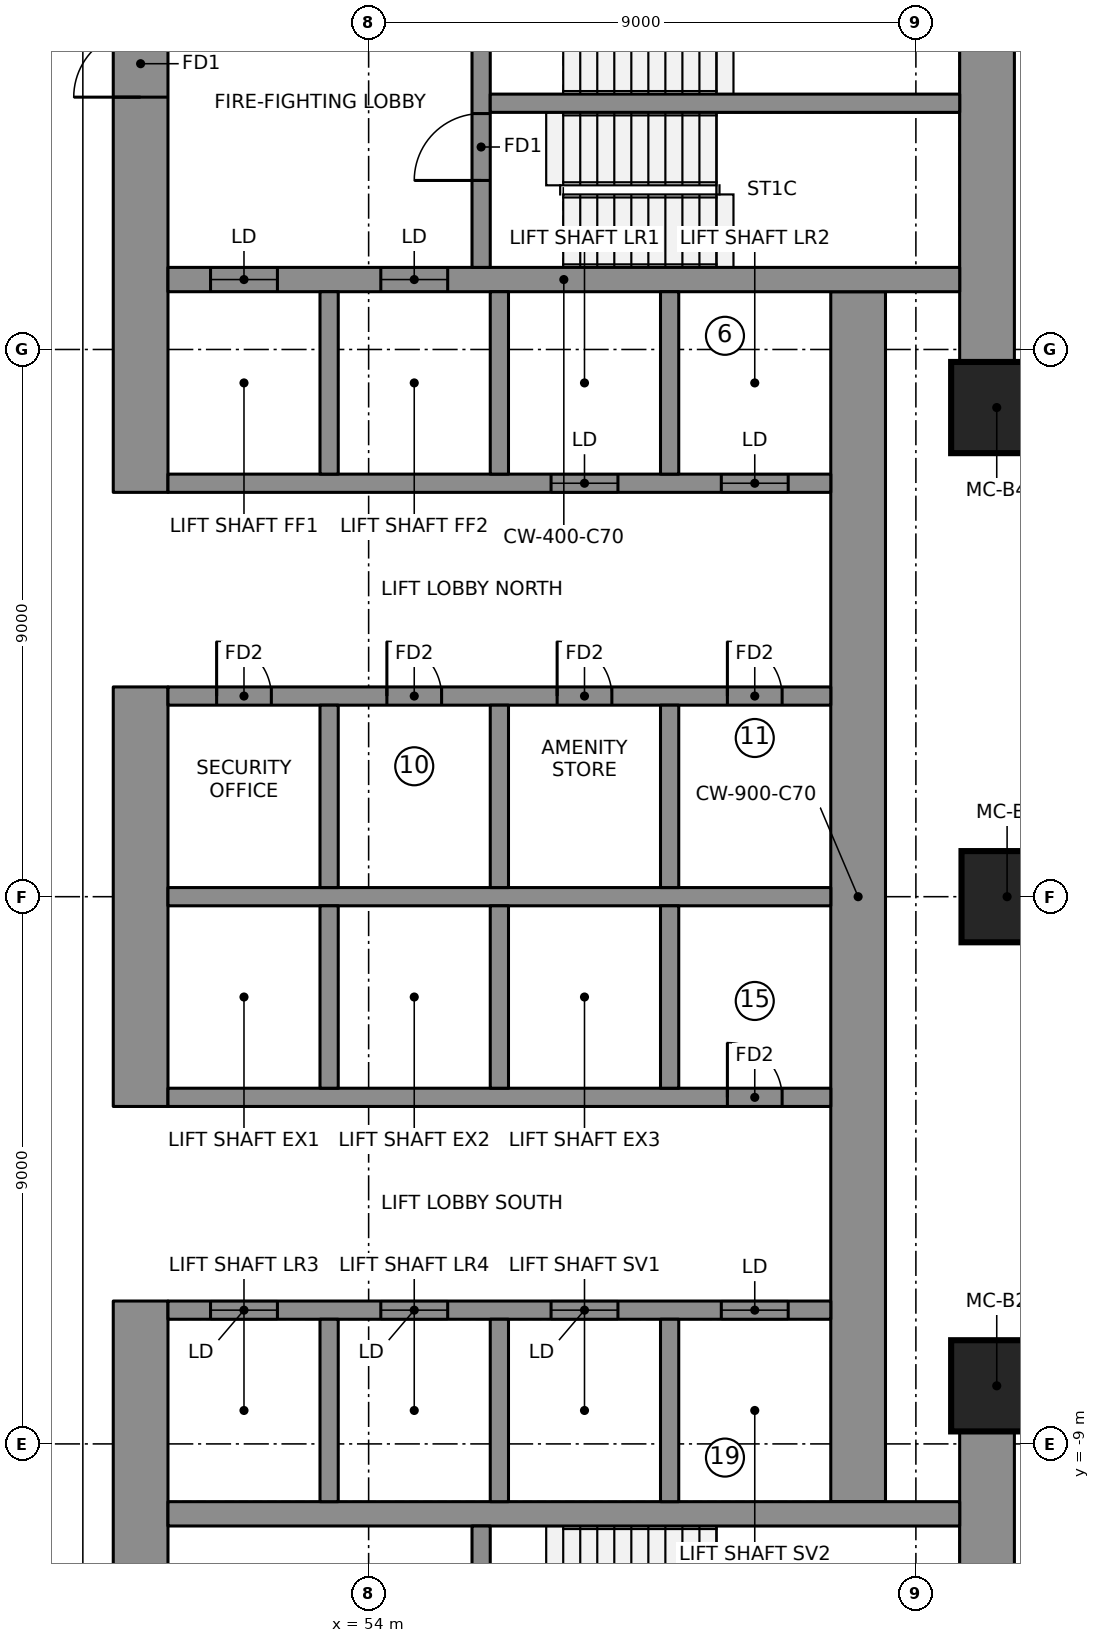
"""IFC4 building model, lengths in metres.
Left out: names, types, materials, properties, quantities, classifications, styles, units other than length and angle.
Written with IfcOpenShell. Run it as: python <this file> out.ifc"""

import sys

from ifc_helpers import new_model, si_unit, direction, frame, frame_2d, origin, origin_2d, place, context, subcontext, project, spatial, rectangle, extrude, element, fill, save


model = new_model("IFC4")
c1 = context("Model", 3, precision=1e-05, world=origin(), true_north=direction((0.0, 1.0)))
c2 = subcontext(c1, "Body", "Model", "MODEL_VIEW")
j1 = project(units=[si_unit("LENGTHUNIT", "METRE"), si_unit("PLANEANGLEUNIT", "RADIAN")], contexts=[c1])
p1 = place(None, origin())
s1 = spatial("IfcSite", under=j1, at=p1, CompositionType="ELEMENT")
p2 = place(p1, origin())
s2 = spatial("IfcBuilding", under=s1, at=p2, CompositionType="ELEMENT")
p3 = place(p2, frame((0.0, 0.0, 147.95)))
s3 = spatial("IfcBuildingStorey", under=s2, at=p3, CompositionType="ELEMENT", Elevation=147.95)
p4 = place(p3, frame((50.25, 6.65, 0.0), z_axis=(0.0, 0.0, 1.0), x_axis=(0.0, 1.0, 0.0)))
e1 = element("IfcWall", 1, at=p4, inside=s3, PredefinedType="SHEAR", context=c2, shape_type="SweptSolid", body=[
    extrude(rectangle(XDim=10.0, YDim=0.9, at=frame_2d((5.0, 0.0))), origin(), (0.0, 0.0, 1.0), 3.55),
])
p5 = place(p4, frame((6.5, 0.0, 0.0)))
e2 = element("IfcOpeningElement", 2, at=p5, cuts=e1, PredefinedType="OPENING", context=c2, shape_type="SweptSolid", body=[
    extrude(rectangle(XDim=1.1, YDim=2.1, at=frame_2d((0.55, 1.05))), frame((0.0, 0.46, 0.0), z_axis=(0.0, -1.0, 0.0), x_axis=(1.0, 0.0, 0.0)), (0.0, 0.0, 1.0), 0.92),
])
p6 = place(p3, frame((50.25, -3.45, 0.0), z_axis=(0.0, 0.0, 1.0), x_axis=(0.0, 1.0, 0.0)))
e3 = element("IfcWall", 3, at=p6, inside=s3, PredefinedType="SHEAR", context=c2, shape_type="SweptSolid", body=[
    extrude(rectangle(XDim=6.9, YDim=0.9, at=frame_2d((3.45, 0.0))), origin(), (0.0, 0.0, 1.0), 3.55),
])
p7 = place(p3, frame((50.25, -16.65, 0.0), z_axis=(0.0, 0.0, 1.0), x_axis=(0.0, 1.0, 0.0)))
e4 = element("IfcWall", 4, at=p7, inside=s3, PredefinedType="SHEAR", context=c2, shape_type="SweptSolid", body=[
    extrude(rectangle(XDim=10.0, YDim=0.9, at=frame_2d((5.0, 0.0))), origin(), (0.0, 0.0, 1.0), 3.55),
])
p8 = place(p7, frame((2.4, 0.0, 0.0)))
e5 = element("IfcOpeningElement", 5, at=p8, cuts=e4, PredefinedType="OPENING", context=c2, shape_type="SweptSolid", body=[
    extrude(rectangle(XDim=1.1, YDim=2.1, at=frame_2d((0.55, 1.05))), frame((0.0, 0.46, 0.0), z_axis=(0.0, -1.0, 0.0), x_axis=(1.0, 0.0, 0.0)), (0.0, 0.0, 1.0), 0.92),
])
for number, where, z_axis, x_axis in (
    (6, (64.17, 8.745, 0.0), (0.0, 0.0, 1.0), (0.0, 1.0, 0.0)),
    (7, (64.17, -15.75, 0.0), (0.0, 0.0, 1.0), (0.0, 1.0, 0.0)),
):
    element("IfcWall", number, at=place(p3, frame(where, z_axis=z_axis, x_axis=x_axis)), inside=s3, PredefinedType="SHEAR", context=c2, shape_type="SweptSolid", body=[
        extrude(rectangle(XDim=7.005, YDim=0.9, at=frame_2d((3.503, 0.0))), origin(), (0.0, 0.0, 1.0), 3.55),
    ])
p9 = place(p3, frame((62.05, -9.95, 0.0), z_axis=(0.0, 0.0, 1.0), x_axis=(0.0, 1.0, 0.0)))
e8 = element("IfcWall", 8, at=p9, inside=s3, PredefinedType="SHEAR", context=c2, shape_type="SweptSolid", body=[
    extrude(rectangle(XDim=19.9, YDim=0.9, at=frame_2d((9.95, 0.0))), origin(), (0.0, 0.0, 1.0), 3.55),
])
p10 = place(p3, frame((50.7, 10.15, 0.0), z_axis=(0.0, 0.0, 1.0), x_axis=(1.0, 0.0, 0.0)))
e9 = element("IfcWall", 9, at=p10, inside=s3, PredefinedType="SHEAR", context=c2, shape_type="SweptSolid", body=[
    extrude(rectangle(XDim=13.02, YDim=0.4, at=frame_2d((6.51, 0.0))), origin(), (0.0, 0.0, 1.0), 3.55),
])
p11 = place(p10, frame((0.7, 0.0, 0.0)))
e10 = element("IfcOpeningElement", 10, at=p11, cuts=e9, PredefinedType="OPENING", context=c2, shape_type="SweptSolid", body=[
    extrude(rectangle(XDim=1.1, YDim=2.1, at=frame_2d((0.55, 1.05))), frame((0.0, 0.21, 0.0), z_axis=(0.0, -1.0, 0.0), x_axis=(1.0, 0.0, 0.0)), (0.0, 0.0, 1.0), 0.42),
])
p12 = place(p10, frame((3.5, 0.0, 0.0)))
e11 = element("IfcOpeningElement", 11, at=p12, cuts=e9, PredefinedType="OPENING", context=c2, shape_type="SweptSolid", body=[
    extrude(rectangle(XDim=1.1, YDim=2.1, at=frame_2d((0.55, 1.05))), frame((0.0, 0.21, 0.0), z_axis=(0.0, -1.0, 0.0), x_axis=(1.0, 0.0, 0.0)), (0.0, 0.0, 1.0), 0.42),
])
p13 = place(p3, frame((50.7, -10.15, 0.0), z_axis=(0.0, 0.0, 1.0), x_axis=(1.0, 0.0, 0.0)))
e12 = element("IfcWall", 12, at=p13, inside=s3, PredefinedType="SHEAR", context=c2, shape_type="SweptSolid", body=[
    extrude(rectangle(XDim=13.02, YDim=0.4, at=frame_2d((6.51, 0.0))), origin(), (0.0, 0.0, 1.0), 3.55),
])
p14 = place(p3, frame((50.7, 0.0, 0.0), z_axis=(0.0, 0.0, 1.0), x_axis=(1.0, 0.0, 0.0)))
e13 = element("IfcWall", 13, at=p14, inside=s3, PredefinedType="SHEAR", context=c2, shape_type="SweptSolid", body=[
    extrude(rectangle(XDim=10.9, YDim=0.3, at=frame_2d((5.45, 0.0))), origin(), (0.0, 0.0, 1.0), 3.55),
])
p15 = place(p3, frame((50.7, 3.3, 0.0), z_axis=(0.0, 0.0, 1.0), x_axis=(1.0, 0.0, 0.0)))
e14 = element("IfcWall", 14, at=p15, inside=s3, PredefinedType="SHEAR", context=c2, shape_type="SweptSolid", body=[
    extrude(rectangle(XDim=10.9, YDim=0.3, at=frame_2d((5.45, 0.0))), origin(), (0.0, 0.0, 1.0), 3.55),
])
p16 = place(p15, frame((0.8, 0.0, 0.0)))
e15 = element("IfcOpeningElement", 15, at=p16, cuts=e14, PredefinedType="OPENING", context=c2, shape_type="SweptSolid", body=[
    extrude(rectangle(XDim=0.9, YDim=2.1, at=frame_2d((0.45, 1.05))), frame((0.0, 0.16, 0.0), z_axis=(0.0, -1.0, 0.0), x_axis=(1.0, 0.0, 0.0)), (0.0, 0.0, 1.0), 0.32),
])
p17 = place(p15, frame((3.6, 0.0, 0.0)))
e16 = element("IfcOpeningElement", 16, at=p17, cuts=e14, PredefinedType="OPENING", context=c2, shape_type="SweptSolid", body=[
    extrude(rectangle(XDim=0.9, YDim=2.1, at=frame_2d((0.45, 1.05))), frame((0.0, 0.16, 0.0), z_axis=(0.0, -1.0, 0.0), x_axis=(1.0, 0.0, 0.0)), (0.0, 0.0, 1.0), 0.32),
])
p18 = place(p15, frame((6.4, 0.0, 0.0)))
e17 = element("IfcOpeningElement", 17, at=p18, cuts=e14, PredefinedType="OPENING", context=c2, shape_type="SweptSolid", body=[
    extrude(rectangle(XDim=0.9, YDim=2.1, at=frame_2d((0.45, 1.05))), frame((0.0, 0.16, 0.0), z_axis=(0.0, -1.0, 0.0), x_axis=(1.0, 0.0, 0.0)), (0.0, 0.0, 1.0), 0.32),
])
p19 = place(p15, frame((9.2, 0.0, 0.0)))
e18 = element("IfcOpeningElement", 18, at=p19, cuts=e14, PredefinedType="OPENING", context=c2, shape_type="SweptSolid", body=[
    extrude(rectangle(XDim=0.9, YDim=2.1, at=frame_2d((0.45, 1.05))), frame((0.0, 0.16, 0.0), z_axis=(0.0, -1.0, 0.0), x_axis=(1.0, 0.0, 0.0)), (0.0, 0.0, 1.0), 0.32),
])
p20 = place(p3, frame((50.7, 6.8, 0.0), z_axis=(0.0, 0.0, 1.0), x_axis=(1.0, 0.0, 0.0)))
e19 = element("IfcWall", 19, at=p20, inside=s3, PredefinedType="SHEAR", context=c2, shape_type="SweptSolid", body=[
    extrude(rectangle(XDim=10.9, YDim=0.3, at=frame_2d((5.45, 0.0))), origin(), (0.0, 0.0, 1.0), 3.55),
])
p21 = place(p20, frame((6.3, 0.0, 0.0)))
e20 = element("IfcOpeningElement", 20, at=p21, cuts=e19, PredefinedType="OPENING", context=c2, shape_type="SweptSolid", body=[
    extrude(rectangle(XDim=1.1, YDim=2.1, at=frame_2d((0.55, 1.05))), frame((0.0, 0.16, 0.0), z_axis=(0.0, -1.0, 0.0), x_axis=(1.0, 0.0, 0.0)), (0.0, 0.0, 1.0), 0.32),
])
p22 = place(p20, frame((9.1, 0.0, 0.0)))
e21 = element("IfcOpeningElement", 21, at=p22, cuts=e19, PredefinedType="OPENING", context=c2, shape_type="SweptSolid", body=[
    extrude(rectangle(XDim=1.1, YDim=2.1, at=frame_2d((0.55, 1.05))), frame((0.0, 0.16, 0.0), z_axis=(0.0, -1.0, 0.0), x_axis=(1.0, 0.0, 0.0)), (0.0, 0.0, 1.0), 0.32),
])
for number, where, z_axis, x_axis in (
    (22, (53.35, 0.15, 0.0), (0.0, 0.0, 1.0), (0.0, 1.0, 0.0)),
    (23, (53.35, 6.95, 0.0), (0.0, 0.0, 1.0), (0.0, 1.0, 0.0)),
    (24, (56.15, 0.15, 0.0), (0.0, 0.0, 1.0), (0.0, 1.0, 0.0)),
    (25, (56.15, 6.95, 0.0), (0.0, 0.0, 1.0), (0.0, 1.0, 0.0)),
    (26, (58.95, 0.15, 0.0), (0.0, 0.0, 1.0), (0.0, 1.0, 0.0)),
    (27, (58.95, 6.95, 0.0), (0.0, 0.0, 1.0), (0.0, 1.0, 0.0)),
):
    element("IfcWall", number, at=place(p3, frame(where, z_axis=z_axis, x_axis=x_axis)), inside=s3, PredefinedType="SHEAR", context=c2, shape_type="SweptSolid", body=[
        extrude(rectangle(XDim=3.0, YDim=0.3, at=frame_2d((1.5, 0.0))), origin(), (0.0, 0.0, 1.0), 3.55),
    ])
p23 = place(p3, frame((50.7, -3.3, 0.0), z_axis=(0.0, 0.0, 1.0), x_axis=(1.0, 0.0, 0.0)))
e28 = element("IfcWall", 28, at=p23, inside=s3, PredefinedType="SHEAR", context=c2, shape_type="SweptSolid", body=[
    extrude(rectangle(XDim=10.9, YDim=0.3, at=frame_2d((5.45, 0.0))), origin(), (0.0, 0.0, 1.0), 3.55),
])
p24 = place(p23, frame((9.2, 0.0, 0.0)))
e29 = element("IfcOpeningElement", 29, at=p24, cuts=e28, PredefinedType="OPENING", context=c2, shape_type="SweptSolid", body=[
    extrude(rectangle(XDim=0.9, YDim=2.1, at=frame_2d((0.45, 1.05))), frame((0.0, 0.16, 0.0), z_axis=(0.0, -1.0, 0.0), x_axis=(1.0, 0.0, 0.0)), (0.0, 0.0, 1.0), 0.32),
])
p25 = place(p3, frame((50.7, -6.8, 0.0), z_axis=(0.0, 0.0, 1.0), x_axis=(1.0, 0.0, 0.0)))
e30 = element("IfcWall", 30, at=p25, inside=s3, PredefinedType="SHEAR", context=c2, shape_type="SweptSolid", body=[
    extrude(rectangle(XDim=10.9, YDim=0.3, at=frame_2d((5.45, 0.0))), origin(), (0.0, 0.0, 1.0), 3.55),
])
p26 = place(p25, frame((0.7, 0.0, 0.0)))
e31 = element("IfcOpeningElement", 31, at=p26, cuts=e30, PredefinedType="OPENING", context=c2, shape_type="SweptSolid", body=[
    extrude(rectangle(XDim=1.1, YDim=2.1, at=frame_2d((0.55, 1.05))), frame((0.0, 0.16, 0.0), z_axis=(0.0, -1.0, 0.0), x_axis=(1.0, 0.0, 0.0)), (0.0, 0.0, 1.0), 0.32),
])
p27 = place(p25, frame((3.5, 0.0, 0.0)))
e32 = element("IfcOpeningElement", 32, at=p27, cuts=e30, PredefinedType="OPENING", context=c2, shape_type="SweptSolid", body=[
    extrude(rectangle(XDim=1.1, YDim=2.1, at=frame_2d((0.55, 1.05))), frame((0.0, 0.16, 0.0), z_axis=(0.0, -1.0, 0.0), x_axis=(1.0, 0.0, 0.0)), (0.0, 0.0, 1.0), 0.32),
])
p28 = place(p25, frame((6.3, 0.0, 0.0)))
e33 = element("IfcOpeningElement", 33, at=p28, cuts=e30, PredefinedType="OPENING", context=c2, shape_type="SweptSolid", body=[
    extrude(rectangle(XDim=1.1, YDim=2.1, at=frame_2d((0.55, 1.05))), frame((0.0, 0.16, 0.0), z_axis=(0.0, -1.0, 0.0), x_axis=(1.0, 0.0, 0.0)), (0.0, 0.0, 1.0), 0.32),
])
p29 = place(p25, frame((9.1, 0.0, 0.0)))
e34 = element("IfcOpeningElement", 34, at=p29, cuts=e30, PredefinedType="OPENING", context=c2, shape_type="SweptSolid", body=[
    extrude(rectangle(XDim=1.1, YDim=2.1, at=frame_2d((0.55, 1.05))), frame((0.0, 0.16, 0.0), z_axis=(0.0, -1.0, 0.0), x_axis=(1.0, 0.0, 0.0)), (0.0, 0.0, 1.0), 0.32),
])
for number, where, z_axis, x_axis in (
    (35, (53.35, -3.15, 0.0), (0.0, 0.0, 1.0), (0.0, 1.0, 0.0)),
    (36, (53.35, -9.95, 0.0), (0.0, 0.0, 1.0), (0.0, 1.0, 0.0)),
    (37, (56.15, -3.15, 0.0), (0.0, 0.0, 1.0), (0.0, 1.0, 0.0)),
    (38, (56.15, -9.95, 0.0), (0.0, 0.0, 1.0), (0.0, 1.0, 0.0)),
    (39, (58.95, -3.15, 0.0), (0.0, 0.0, 1.0), (0.0, 1.0, 0.0)),
    (40, (58.95, -9.95, 0.0), (0.0, 0.0, 1.0), (0.0, 1.0, 0.0)),
):
    element("IfcWall", number, at=place(p3, frame(where, z_axis=z_axis, x_axis=x_axis)), inside=s3, PredefinedType="SHEAR", context=c2, shape_type="SweptSolid", body=[
        extrude(rectangle(XDim=3.0, YDim=0.3, at=frame_2d((1.5, 0.0))), origin(), (0.0, 0.0, 1.0), 3.55),
    ])
p30 = place(p3, frame((55.85, 10.35, 0.0), z_axis=(0.0, 0.0, 1.0), x_axis=(0.0, 1.0, 0.0)))
e41 = element("IfcWall", 41, at=p30, inside=s3, PredefinedType="SHEAR", context=c2, shape_type="SweptSolid", body=[
    extrude(rectangle(XDim=5.4, YDim=0.3, at=frame_2d((2.7, 0.0))), origin(), (0.0, 0.0, 1.0), 3.55),
])
p31 = place(p30, frame((1.43, 0.0, 0.0)))
e42 = element("IfcOpeningElement", 42, at=p31, cuts=e41, PredefinedType="OPENING", context=c2, shape_type="SweptSolid", body=[
    extrude(rectangle(XDim=1.1, YDim=2.1, at=frame_2d((0.55, 1.05))), frame((0.0, 0.16, 0.0), z_axis=(0.0, -1.0, 0.0), x_axis=(1.0, 0.0, 0.0)), (0.0, 0.0, 1.0), 0.32),
])
p32 = place(p30, frame((3.6, 0.0, 0.0)))
e43 = element("IfcOpeningElement", 43, at=p32, cuts=e41, PredefinedType="OPENING", context=c2, shape_type="SweptSolid", body=[
    extrude(rectangle(XDim=1.1, YDim=2.1, at=frame_2d((0.55, 1.05))), frame((0.0, 0.16, 0.0), z_axis=(0.0, -1.0, 0.0), x_axis=(1.0, 0.0, 0.0)), (0.0, 0.0, 1.0), 0.32),
])
p33 = place(p3, frame((55.85, -15.75, 0.0), z_axis=(0.0, 0.0, 1.0), x_axis=(0.0, 1.0, 0.0)))
e44 = element("IfcWall", 44, at=p33, inside=s3, PredefinedType="SHEAR", context=c2, shape_type="SweptSolid", body=[
    extrude(rectangle(XDim=5.4, YDim=0.3, at=frame_2d((2.7, 0.0))), origin(), (0.0, 0.0, 1.0), 3.55),
])
p34 = place(p33, frame((3.6, 0.0, 0.0)))
e45 = element("IfcOpeningElement", 45, at=p34, cuts=e44, PredefinedType="OPENING", context=c2, shape_type="SweptSolid", body=[
    extrude(rectangle(XDim=1.1, YDim=2.1, at=frame_2d((0.55, 1.05))), frame((0.0, 0.16, 0.0), z_axis=(0.0, -1.0, 0.0), x_axis=(1.0, 0.0, 0.0)), (0.0, 0.0, 1.0), 0.32),
])
p35 = place(p33, frame((0.8, 0.0, 0.0)))
e46 = element("IfcOpeningElement", 46, at=p35, cuts=e44, PredefinedType="OPENING", context=c2, shape_type="SweptSolid", body=[
    extrude(rectangle(XDim=0.9, YDim=2.1, at=frame_2d((0.45, 1.05))), frame((0.0, 0.16, 0.0), z_axis=(0.0, -1.0, 0.0), x_axis=(1.0, 0.0, 0.0)), (0.0, 0.0, 1.0), 0.32),
])
p36 = place(p3, frame((56.0, 13.05, 0.0), z_axis=(0.0, 0.0, 1.0), x_axis=(1.0, 0.0, 0.0)))
e47 = element("IfcWall", 47, at=p36, inside=s3, PredefinedType="SHEAR", context=c2, shape_type="SweptSolid", body=[
    extrude(rectangle(XDim=7.72, YDim=0.3, at=frame_2d((3.86, 0.0))), origin(), (0.0, 0.0, 1.0), 3.55),
])
for number, where, z_axis, x_axis in (
    (48, (64.33, -8.045, 0.0), (0.0, 0.0, 1.0), (1.0, 0.0, 0.0)),
    (49, (64.5, 0.0, 0.0), (0.0, 0.0, 1.0), (1.0, 0.0, 0.0)),
    (50, (64.33, 8.045, 0.0), (0.0, 0.0, 1.0), (1.0, 0.0, 0.0)),
):
    element("IfcColumn", number, at=place(p3, frame(where, z_axis=z_axis, x_axis=x_axis)), inside=s3, PredefinedType="COLUMN", context=c2, shape_type="SweptSolid", body=[
        extrude(rectangle(XDim=1.5, YDim=1.5, at=origin_2d()), origin(), (0.0, 0.0, 1.0), 3.55),
    ])
p37 = place(p11, origin())
e51 = element("IfcDoor", 51, at=p37, inside=s3, OperationType="DOUBLE_DOOR_SLIDING", PredefinedType="DOOR", context=c2, shape_type="SweptSolid", body=[
    extrude(rectangle(XDim=1.1, YDim=2.1, at=frame_2d((0.55, 1.05))), frame((0.0, 0.025, 0.0), z_axis=(0.0, -1.0, 0.0), x_axis=(1.0, 0.0, 0.0)), (0.0, 0.0, 1.0), 0.05),
])
fill(e10, e51)
p38 = place(p12, origin())
e52 = element("IfcDoor", 52, at=p38, inside=s3, OperationType="DOUBLE_DOOR_SLIDING", PredefinedType="DOOR", context=c2, shape_type="SweptSolid", body=[
    extrude(rectangle(XDim=1.1, YDim=2.1, at=frame_2d((0.55, 1.05))), frame((0.0, 0.025, 0.0), z_axis=(0.0, -1.0, 0.0), x_axis=(1.0, 0.0, 0.0)), (0.0, 0.0, 1.0), 0.05),
])
fill(e11, e52)
p39 = place(p21, origin())
e53 = element("IfcDoor", 53, at=p39, inside=s3, OperationType="DOUBLE_DOOR_SLIDING", PredefinedType="DOOR", context=c2, shape_type="SweptSolid", body=[
    extrude(rectangle(XDim=1.1, YDim=2.1, at=frame_2d((0.55, 1.05))), frame((0.0, 0.025, 0.0), z_axis=(0.0, -1.0, 0.0), x_axis=(1.0, 0.0, 0.0)), (0.0, 0.0, 1.0), 0.05),
])
fill(e20, e53)
p40 = place(p22, origin())
e54 = element("IfcDoor", 54, at=p40, inside=s3, OperationType="DOUBLE_DOOR_SLIDING", PredefinedType="DOOR", context=c2, shape_type="SweptSolid", body=[
    extrude(rectangle(XDim=1.1, YDim=2.1, at=frame_2d((0.55, 1.05))), frame((0.0, 0.025, 0.0), z_axis=(0.0, -1.0, 0.0), x_axis=(1.0, 0.0, 0.0)), (0.0, 0.0, 1.0), 0.05),
])
fill(e21, e54)
p41 = place(p26, origin())
e55 = element("IfcDoor", 55, at=p41, inside=s3, OperationType="DOUBLE_DOOR_SLIDING", PredefinedType="DOOR", context=c2, shape_type="SweptSolid", body=[
    extrude(rectangle(XDim=1.1, YDim=2.1, at=frame_2d((0.55, 1.05))), frame((0.0, 0.025, 0.0), z_axis=(0.0, -1.0, 0.0), x_axis=(1.0, 0.0, 0.0)), (0.0, 0.0, 1.0), 0.05),
])
fill(e31, e55)
p42 = place(p27, origin())
e56 = element("IfcDoor", 56, at=p42, inside=s3, OperationType="DOUBLE_DOOR_SLIDING", PredefinedType="DOOR", context=c2, shape_type="SweptSolid", body=[
    extrude(rectangle(XDim=1.1, YDim=2.1, at=frame_2d((0.55, 1.05))), frame((0.0, 0.025, 0.0), z_axis=(0.0, -1.0, 0.0), x_axis=(1.0, 0.0, 0.0)), (0.0, 0.0, 1.0), 0.05),
])
fill(e32, e56)
p43 = place(p28, origin())
e57 = element("IfcDoor", 57, at=p43, inside=s3, OperationType="DOUBLE_DOOR_SLIDING", PredefinedType="DOOR", context=c2, shape_type="SweptSolid", body=[
    extrude(rectangle(XDim=1.1, YDim=2.1, at=frame_2d((0.55, 1.05))), frame((0.0, 0.025, 0.0), z_axis=(0.0, -1.0, 0.0), x_axis=(1.0, 0.0, 0.0)), (0.0, 0.0, 1.0), 0.05),
])
fill(e33, e57)
p44 = place(p29, origin())
e58 = element("IfcDoor", 58, at=p44, inside=s3, OperationType="DOUBLE_DOOR_SLIDING", PredefinedType="DOOR", context=c2, shape_type="SweptSolid", body=[
    extrude(rectangle(XDim=1.1, YDim=2.1, at=frame_2d((0.55, 1.05))), frame((0.0, 0.025, 0.0), z_axis=(0.0, -1.0, 0.0), x_axis=(1.0, 0.0, 0.0)), (0.0, 0.0, 1.0), 0.05),
])
fill(e34, e58)
p45 = place(p31, origin())
e59 = element("IfcDoor", 59, at=p45, inside=s3, OperationType="SINGLE_SWING_RIGHT", PredefinedType="DOOR", context=c2, shape_type="SweptSolid", body=[
    extrude(rectangle(XDim=1.1, YDim=2.1, at=frame_2d((0.55, 1.05))), frame((0.0, 0.025, 0.0), z_axis=(0.0, -1.0, 0.0), x_axis=(1.0, 0.0, 0.0)), (0.0, 0.0, 1.0), 0.05),
])
fill(e42, e59)
p46 = place(p5, origin())
e60 = element("IfcDoor", 60, at=p46, inside=s3, OperationType="SINGLE_SWING_RIGHT", PredefinedType="DOOR", context=c2, shape_type="SweptSolid", body=[
    extrude(rectangle(XDim=1.1, YDim=2.1, at=frame_2d((0.55, 1.05))), frame((0.0, 0.025, 0.0), z_axis=(0.0, -1.0, 0.0), x_axis=(1.0, 0.0, 0.0)), (0.0, 0.0, 1.0), 0.05),
])
fill(e2, e60)
p47 = place(p16, origin())
e61 = element("IfcDoor", 61, at=p47, inside=s3, OperationType="SINGLE_SWING_LEFT", PredefinedType="DOOR", context=c2, shape_type="SweptSolid", body=[
    extrude(rectangle(XDim=0.9, YDim=2.1, at=frame_2d((0.45, 1.05))), frame((0.0, 0.025, 0.0), z_axis=(0.0, -1.0, 0.0), x_axis=(1.0, 0.0, 0.0)), (0.0, 0.0, 1.0), 0.05),
])
fill(e15, e61)
p48 = place(p17, origin())
e62 = element("IfcDoor", 62, at=p48, inside=s3, OperationType="SINGLE_SWING_LEFT", PredefinedType="DOOR", context=c2, shape_type="SweptSolid", body=[
    extrude(rectangle(XDim=0.9, YDim=2.1, at=frame_2d((0.45, 1.05))), frame((0.0, 0.025, 0.0), z_axis=(0.0, -1.0, 0.0), x_axis=(1.0, 0.0, 0.0)), (0.0, 0.0, 1.0), 0.05),
])
fill(e16, e62)
p49 = place(p18, origin())
e63 = element("IfcDoor", 63, at=p49, inside=s3, OperationType="SINGLE_SWING_LEFT", PredefinedType="DOOR", context=c2, shape_type="SweptSolid", body=[
    extrude(rectangle(XDim=0.9, YDim=2.1, at=frame_2d((0.45, 1.05))), frame((0.0, 0.025, 0.0), z_axis=(0.0, -1.0, 0.0), x_axis=(1.0, 0.0, 0.0)), (0.0, 0.0, 1.0), 0.05),
])
fill(e17, e63)
p50 = place(p19, origin())
e64 = element("IfcDoor", 64, at=p50, inside=s3, OperationType="SINGLE_SWING_LEFT", PredefinedType="DOOR", context=c2, shape_type="SweptSolid", body=[
    extrude(rectangle(XDim=0.9, YDim=2.1, at=frame_2d((0.45, 1.05))), frame((0.0, 0.025, 0.0), z_axis=(0.0, -1.0, 0.0), x_axis=(1.0, 0.0, 0.0)), (0.0, 0.0, 1.0), 0.05),
])
fill(e18, e64)
p51 = place(p24, origin())
e65 = element("IfcDoor", 65, at=p51, inside=s3, OperationType="SINGLE_SWING_LEFT", PredefinedType="DOOR", context=c2, shape_type="SweptSolid", body=[
    extrude(rectangle(XDim=0.9, YDim=2.1, at=frame_2d((0.45, 1.05))), frame((0.0, 0.025, 0.0), z_axis=(0.0, -1.0, 0.0), x_axis=(1.0, 0.0, 0.0)), (0.0, 0.0, 1.0), 0.05),
])
fill(e29, e65)
save(model, sys.argv[1])
